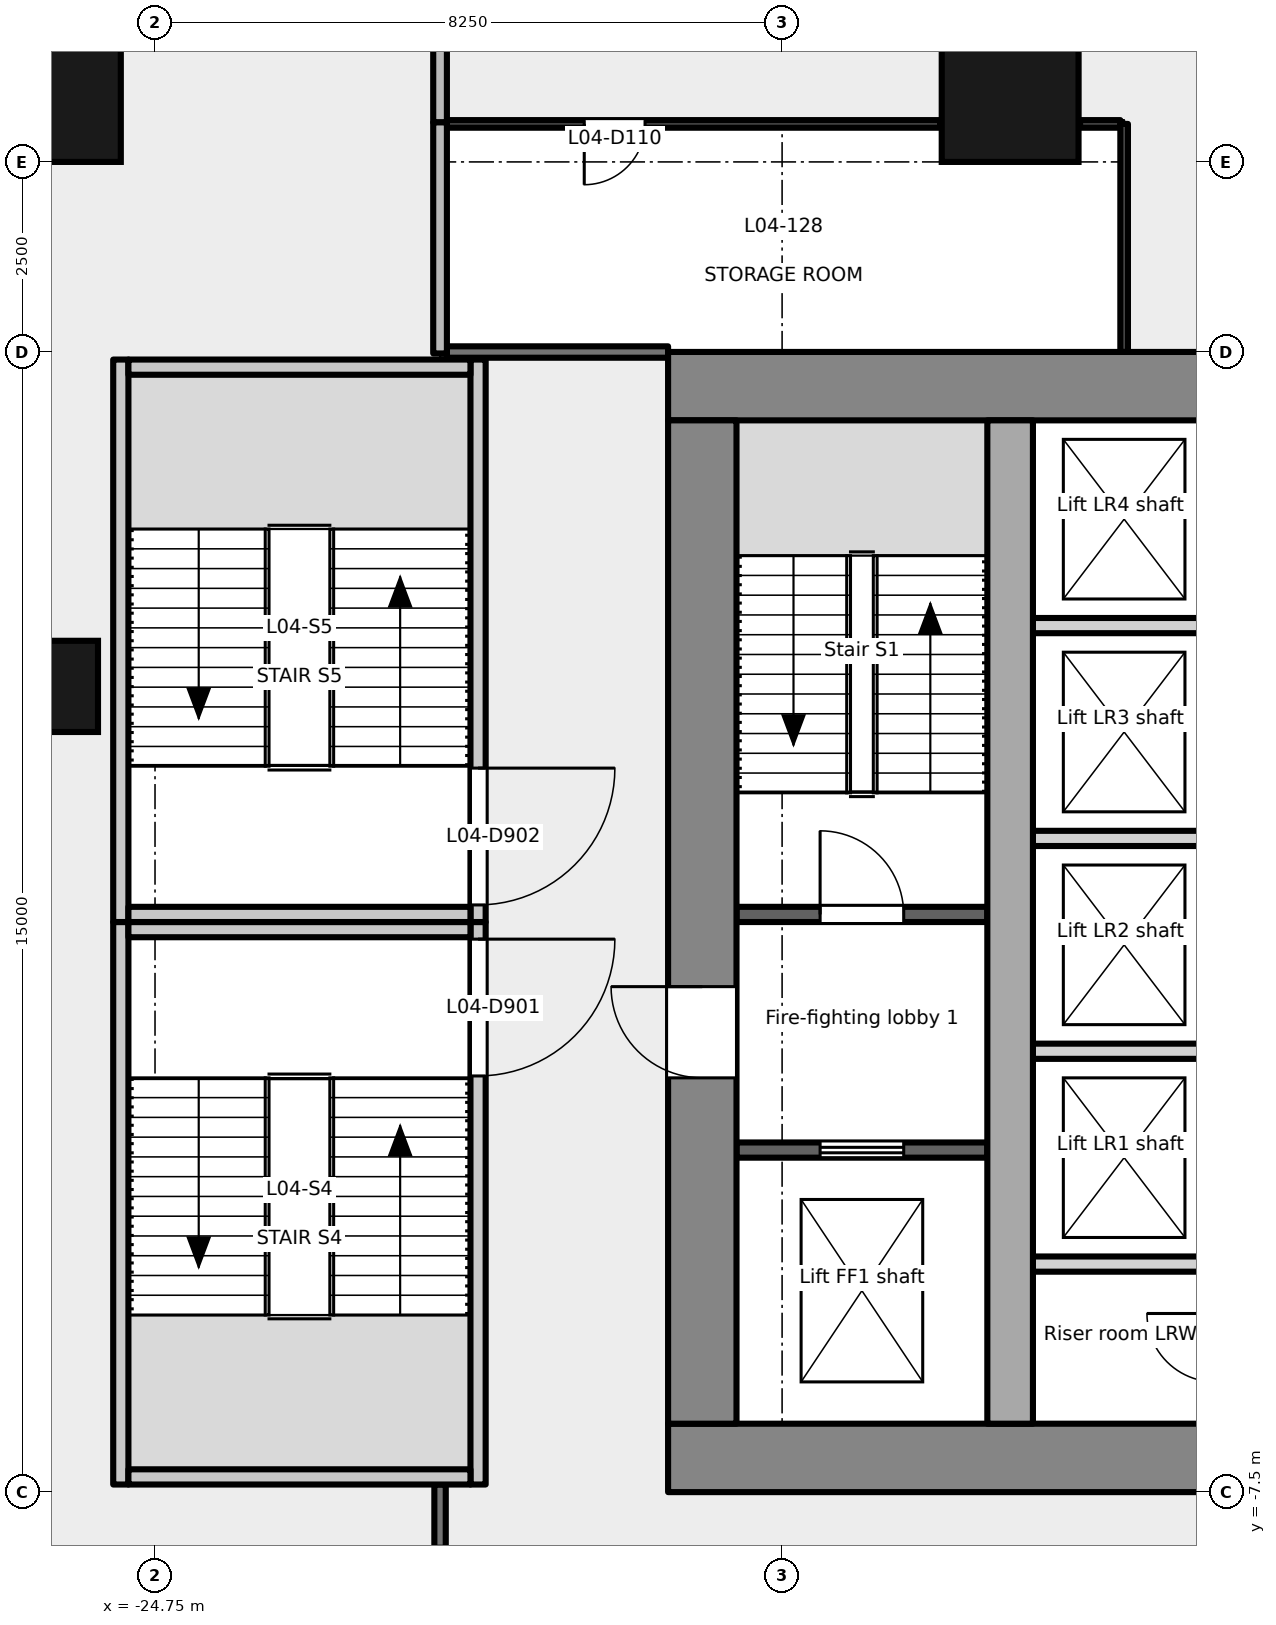
"""IFC4 building model, lengths in metres.
Left out: names, types, materials, properties, quantities, classifications, styles, units other than length and angle.
Written with IfcOpenShell. Run it as: python <this file> out.ifc"""

import sys

from ifc_helpers import new_model, si_unit, direction, frame, frame_2d, origin, origin_2d, place, context, subcontext, project, spatial, rectangle, extrude, element, fill, save


model = new_model("IFC4")
c1 = context("Model", 3, precision=1e-05, world=origin(), true_north=direction((0.0, 1.0)))
c2 = subcontext(c1, "Body", "Model", "MODEL_VIEW")
j1 = project(units=[si_unit("LENGTHUNIT", "METRE"), si_unit("PLANEANGLEUNIT", "RADIAN")], contexts=[c1])
p1 = place(None, origin())
s1 = spatial("IfcSite", under=j1, at=p1, CompositionType="ELEMENT")
p2 = place(p1, origin())
s2 = spatial("IfcBuilding", under=s1, at=p2, CompositionType="ELEMENT")
p3 = place(p2, frame((0.0, 0.0, 22.2)))
s3 = spatial("IfcBuildingStorey", under=s2, at=p3, CompositionType="ELEMENT", Elevation=22.2)
for number, where, z_axis, x_axis in (
    (1, (-26.1, 10.9, -0.2), (0.0, 0.0, 1.0), (1.0, 0.0, 0.0)),
    (2, (-13.5, 10.9, -0.2), (0.0, 0.0, 1.0), (1.0, 0.0, 0.0)),
):
    element("IfcColumn", number, at=place(p3, frame(where, z_axis=z_axis, x_axis=x_axis)), inside=s3, PredefinedType="COLUMN", context=c2, shape_type="SweptSolid", body=[
        extrude(rectangle(XDim=1.8, YDim=1.8, at=origin_2d()), origin(), (0.0, 0.0, 1.0), 4.8),
    ])
p4 = place(p3, frame((-26.1, 3.1, -0.2), z_axis=(0.0, 0.0, 1.0), x_axis=(1.0, 0.0, 0.0)))
e3 = element("IfcColumn", 3, at=p4, inside=s3, PredefinedType="COLUMN", context=c2, shape_type="SweptSolid", body=[
    extrude(rectangle(XDim=1.2, YDim=1.2, at=origin_2d()), origin(), (0.0, 0.0, 1.0), 4.8),
])
p5 = place(p3, frame((-18.0, -7.05, -0.2), z_axis=(0.0, 0.0, 1.0), x_axis=(1.0, 0.0, 0.0)))
e4 = element("IfcWall", 4, at=p5, inside=s3, PredefinedType="SHEAR", context=c2, shape_type="SweptSolid", body=[
    extrude(rectangle(XDim=36.0, YDim=0.9, at=frame_2d((18.0, 0.0))), origin(), (0.0, 0.0, 1.0), 4.8),
])
p6 = place(p5, frame((7.8, 0.0, 0.2)))
e5 = element("IfcOpeningElement", 5, at=p6, cuts=e4, PredefinedType="OPENING", context=c2, shape_type="SweptSolid", body=[
    extrude(rectangle(XDim=2.4, YDim=2.1, at=frame_2d((1.2, 1.05))), frame((0.0, 0.46, 0.0), z_axis=(0.0, -1.0, 0.0), x_axis=(1.0, 0.0, 0.0)), (0.0, 0.0, 1.0), 0.921),
])
p7 = place(p5, frame((17.4, 0.0, 0.2)))
e6 = element("IfcOpeningElement", 6, at=p7, cuts=e4, PredefinedType="OPENING", context=c2, shape_type="SweptSolid", body=[
    extrude(rectangle(XDim=1.2, YDim=2.1, at=frame_2d((0.6, 1.05))), frame((0.0, 0.46, 0.0), z_axis=(0.0, -1.0, 0.0), x_axis=(1.0, 0.0, 0.0)), (0.0, 0.0, 1.0), 0.921),
])
p8 = place(p5, frame((26.1, 0.0, 0.2)))
e7 = element("IfcOpeningElement", 7, at=p8, cuts=e4, PredefinedType="OPENING", context=c2, shape_type="SweptSolid", body=[
    extrude(rectangle(XDim=2.4, YDim=2.1, at=frame_2d((1.2, 1.05))), frame((0.0, 0.46, 0.0), z_axis=(0.0, -1.0, 0.0), x_axis=(1.0, 0.0, 0.0)), (0.0, 0.0, 1.0), 0.921),
])
p9 = place(p3, frame((-18.0, 7.05, -0.2), z_axis=(0.0, 0.0, 1.0), x_axis=(1.0, 0.0, 0.0)))
e8 = element("IfcWall", 8, at=p9, inside=s3, PredefinedType="SHEAR", context=c2, shape_type="SweptSolid", body=[
    extrude(rectangle(XDim=36.0, YDim=0.9, at=frame_2d((18.0, 0.0))), origin(), (0.0, 0.0, 1.0), 4.8),
])
p10 = place(p3, frame((-17.55, -6.6, -0.2), z_axis=(0.0, 0.0, 1.0), x_axis=(0.0, 1.0, 0.0)))
e9 = element("IfcWall", 9, at=p10, inside=s3, PredefinedType="SHEAR", context=c2, shape_type="SweptSolid", body=[
    extrude(rectangle(XDim=13.2, YDim=0.9, at=frame_2d((6.6, 0.0))), origin(), (0.0, 0.0, 1.0), 4.8),
])
p11 = place(p10, frame((4.55, 0.0, 0.2)))
e10 = element("IfcOpeningElement", 10, at=p11, cuts=e9, PredefinedType="OPENING", context=c2, shape_type="SweptSolid", body=[
    extrude(rectangle(XDim=1.2, YDim=2.1, at=frame_2d((0.6, 1.05))), frame((0.0, 0.46, 0.0), z_axis=(0.0, -1.0, 0.0), x_axis=(1.0, 0.0, 0.0)), (0.0, 0.0, 1.0), 0.921),
])
p12 = place(p3, frame((-13.5, -6.6, -0.2), z_axis=(0.0, 0.0, 1.0), x_axis=(0.0, 1.0, 0.0)))
e11 = element("IfcWall", 11, at=p12, inside=s3, PredefinedType="SHEAR", context=c2, shape_type="SweptSolid", body=[
    extrude(rectangle(XDim=13.2, YDim=0.6, at=frame_2d((6.6, 0.0))), origin(), (0.0, 0.0, 1.0), 4.8),
])
p13 = place(p3, frame((-17.1, -3.0, 0.0), z_axis=(0.0, 0.0, 1.0), x_axis=(1.0, 0.0, 0.0)))
e12 = element("IfcWall", 12, at=p13, inside=s3, PredefinedType="PARTITIONING", context=c2, shape_type="SweptSolid", body=[
    extrude(rectangle(XDim=3.3, YDim=0.2, at=frame_2d((1.65, 0.0))), origin(), (0.0, 0.0, 1.0), 4.6),
])
p14 = place(p13, frame((1.1, 0.0, 0.0)))
e13 = element("IfcOpeningElement", 13, at=p14, cuts=e12, PredefinedType="OPENING", context=c2, shape_type="SweptSolid", body=[
    extrude(rectangle(XDim=1.1, YDim=2.1, at=frame_2d((0.55, 1.05))), frame((0.0, 0.111, 0.0), z_axis=(0.0, -1.0, 0.0), x_axis=(1.0, 0.0, 0.0)), (0.0, 0.0, 1.0), 0.221),
])
p15 = place(p3, frame((-17.1, 0.1, 0.0), z_axis=(0.0, 0.0, 1.0), x_axis=(1.0, 0.0, 0.0)))
e14 = element("IfcWall", 14, at=p15, inside=s3, PredefinedType="PARTITIONING", context=c2, shape_type="SweptSolid", body=[
    extrude(rectangle(XDim=3.3, YDim=0.2, at=frame_2d((1.65, 0.0))), origin(), (0.0, 0.0, 1.0), 4.6),
])
p16 = place(p15, frame((1.1, 0.0, 0.0)))
e15 = element("IfcOpeningElement", 15, at=p16, cuts=e14, PredefinedType="OPENING", context=c2, shape_type="SweptSolid", body=[
    extrude(rectangle(XDim=1.1, YDim=2.1, at=frame_2d((0.55, 1.05))), frame((0.0, 0.111, 0.0), z_axis=(0.0, -1.0, 0.0), x_axis=(1.0, 0.0, 0.0)), (0.0, 0.0, 1.0), 0.221),
])
for number, where, z_axis, x_axis in (
    (16, (-13.2, -1.7, 0.0), (0.0, 0.0, 1.0), (1.0, 0.0, 0.0)),
    (17, (-13.2, 1.1, 0.0), (0.0, 0.0, 1.0), (1.0, 0.0, 0.0)),
    (18, (-13.2, 3.9, 0.0), (0.0, 0.0, 1.0), (1.0, 0.0, 0.0)),
    (19, (-13.2, -4.5, 0.0), (0.0, 0.0, 1.0), (1.0, 0.0, 0.0)),
):
    element("IfcWall", number, at=place(p3, frame(where, z_axis=z_axis, x_axis=x_axis)), inside=s3, PredefinedType="PARTITIONING", context=c2, shape_type="SweptSolid", body=[
        extrude(rectangle(XDim=2.3, YDim=0.2, at=frame_2d((1.15, 0.0))), origin(), (0.0, 0.0, 1.0), 4.6),
    ])
p17 = place(p3, frame((-20.5, 0.0, -0.2), z_axis=(0.0, 0.0, 1.0), x_axis=(0.0, -1.0, 0.0)))
e20 = element("IfcWall", 20, at=p17, inside=s3, PredefinedType="SHEAR", context=c2, shape_type="SweptSolid", body=[
    extrude(rectangle(XDim=7.4, YDim=0.2, at=frame_2d((3.7, 0.0))), origin(), (0.0, 0.0, 1.0), 4.8),
])
p18 = place(p17, frame((0.225, 0.0, 0.2)))
e21 = element("IfcOpeningElement", 21, at=p18, cuts=e20, PredefinedType="OPENING", context=c2, shape_type="SweptSolid", body=[
    extrude(rectangle(XDim=1.8, YDim=2.1, at=frame_2d((0.9, 1.05))), frame((0.0, 0.111, 0.0), z_axis=(0.0, -1.0, 0.0), x_axis=(1.0, 0.0, 0.0)), (0.0, 0.0, 1.0), 0.221),
])
p19 = place(p3, frame((-25.2, -7.4, -0.2), z_axis=(0.0, 0.0, 1.0), x_axis=(0.0, 1.0, 0.0)))
e22 = element("IfcWall", 22, at=p19, inside=s3, PredefinedType="SHEAR", context=c2, shape_type="SweptSolid", body=[
    extrude(rectangle(XDim=7.4, YDim=0.2, at=frame_2d((3.7, 0.0))), origin(), (0.0, 0.0, 1.0), 4.8),
])
for number, where, z_axis, x_axis in (
    (23, (-25.1, -0.1, -0.2), (0.0, 0.0, 1.0), (1.0, 0.0, 0.0)),
    (24, (-25.1, -7.3, -0.2), (0.0, 0.0, 1.0), (1.0, 0.0, 0.0)),
):
    element("IfcWall", number, at=place(p3, frame(where, z_axis=z_axis, x_axis=x_axis)), inside=s3, PredefinedType="SHEAR", context=c2, shape_type="SweptSolid", body=[
        extrude(rectangle(XDim=4.5, YDim=0.2, at=frame_2d((2.25, 0.0))), origin(), (0.0, 0.0, 1.0), 4.8),
    ])
p20 = place(p3, frame((-20.5, 7.4, -0.2), z_axis=(0.0, 0.0, 1.0), x_axis=(0.0, -1.0, 0.0)))
e25 = element("IfcWall", 25, at=p20, inside=s3, PredefinedType="SHEAR", context=c2, shape_type="SweptSolid", body=[
    extrude(rectangle(XDim=7.4, YDim=0.2, at=frame_2d((3.7, 0.0))), origin(), (0.0, 0.0, 1.0), 4.8),
])
p21 = place(p20, frame((5.375, 0.0, 0.2)))
e26 = element("IfcOpeningElement", 26, at=p21, cuts=e25, PredefinedType="OPENING", context=c2, shape_type="SweptSolid", body=[
    extrude(rectangle(XDim=1.8, YDim=2.1, at=frame_2d((0.9, 1.05))), frame((0.0, 0.111, 0.0), z_axis=(0.0, -1.0, 0.0), x_axis=(1.0, 0.0, 0.0)), (0.0, 0.0, 1.0), 0.221),
])
p22 = place(p3, frame((-25.2, 0.0, -0.2), z_axis=(0.0, 0.0, 1.0), x_axis=(0.0, 1.0, 0.0)))
e27 = element("IfcWall", 27, at=p22, inside=s3, PredefinedType="SHEAR", context=c2, shape_type="SweptSolid", body=[
    extrude(rectangle(XDim=7.4, YDim=0.2, at=frame_2d((3.7, 0.0))), origin(), (0.0, 0.0, 1.0), 4.8),
])
for number, where, z_axis, x_axis in (
    (28, (-25.1, 7.3, -0.2), (0.0, 0.0, 1.0), (1.0, 0.0, 0.0)),
    (29, (-25.1, 0.1, -0.2), (0.0, 0.0, 1.0), (1.0, 0.0, 0.0)),
):
    element("IfcWall", number, at=place(p3, frame(where, z_axis=z_axis, x_axis=x_axis)), inside=s3, PredefinedType="SHEAR", context=c2, shape_type="SweptSolid", body=[
        extrude(rectangle(XDim=4.5, YDim=0.2, at=frame_2d((2.25, 0.0))), origin(), (0.0, 0.0, 1.0), 4.8),
    ])
p23 = place(p3, frame((-21.0, -11.425, 0.0), z_axis=(0.0, 0.0, 1.0), x_axis=(0.0, 1.0, 0.0)))
e30 = element("IfcWall", 30, at=p23, inside=s3, PredefinedType="PARTITIONING", context=c2, shape_type="SweptSolid", body=[
    extrude(rectangle(XDim=4.025, YDim=0.15, at=frame_2d((2.013, 0.0))), origin(), (0.0, 0.0, 1.0), 4.0),
])
p24 = place(p23, frame((0.813, 0.0, 0.0)))
e31 = element("IfcOpeningElement", 31, at=p24, cuts=e30, PredefinedType="OPENING", context=c2, shape_type="SweptSolid", body=[
    extrude(rectangle(XDim=2.4, YDim=2.4, at=frame_2d((1.2, 1.2))), frame((0.0, 0.085, 0.0), z_axis=(0.0, -1.0, 0.0), x_axis=(1.0, 0.0, 0.0)), (0.0, 0.0, 1.0), 0.171),
])
p25 = place(p3, frame((-20.91, 7.499, 0.0), z_axis=(0.0, 0.0, 1.0), x_axis=(1.0, 0.0, 0.0)))
e32 = element("IfcWall", 32, at=p25, inside=s3, PredefinedType="PARTITIONING", context=c2, shape_type="SweptSolid", body=[
    extrude(rectangle(XDim=2.91, YDim=0.15, at=frame_2d((1.455, 0.0))), origin(), (0.0, 0.0, 1.0), 4.6),
])
p26 = place(p3, frame((-21.0, 11.99, 0.0), z_axis=(0.0, 0.0, 1.0), x_axis=(0.0, -1.0, 0.0)))
e33 = element("IfcWall", 33, at=p26, inside=s3, PredefinedType="PARTITIONING", context=c2, shape_type="SweptSolid", body=[
    extrude(rectangle(XDim=1.47, YDim=0.18, at=frame_2d((0.735, 0.0))), origin(), (0.0, 0.0, 1.0), 4.6),
])
p27 = place(p3, frame((-21.0, 10.52, 0.0), z_axis=(0.0, 0.0, 1.0), x_axis=(0.0, -1.0, 0.0)))
e34 = element("IfcWall", 34, at=p27, inside=s3, PredefinedType="PARTITIONING", context=c2, shape_type="SweptSolid", body=[
    extrude(rectangle(XDim=3.04, YDim=0.18, at=frame_2d((1.52, 0.0))), origin(), (0.0, 0.0, 1.0), 3.5),
])
p28 = place(p3, frame((-14.42, 10.5, 0.0), z_axis=(0.0, 0.0, 1.0), x_axis=(-1.0, 0.0, 0.0)))
e35 = element("IfcWall", 35, at=p28, inside=s3, PredefinedType="PARTITIONING", context=c2, shape_type="SweptSolid", body=[
    extrude(rectangle(XDim=6.49, YDim=0.1, at=frame_2d((3.245, 0.0))), origin(), (0.0, 0.0, 1.0), 4.6),
])
p29 = place(p28, frame((3.883, 0.0, 0.0)))
e36 = element("IfcOpeningElement", 36, at=p29, cuts=e35, PredefinedType="OPENING", context=c2, shape_type="SweptSolid", body=[
    extrude(rectangle(XDim=0.8, YDim=2.1, at=frame_2d((0.4, 1.05))), frame((0.0, 0.061, 0.0), z_axis=(0.0, -1.0, 0.0), x_axis=(1.0, 0.0, 0.0)), (0.0, 0.0, 1.0), 0.121),
])
p30 = place(p3, frame((-12.05, 10.5, 0.0), z_axis=(0.0, 0.0, 1.0), x_axis=(-1.0, 0.0, 0.0)))
e37 = element("IfcWall", 37, at=p30, inside=s3, PredefinedType="PARTITIONING", context=c2, shape_type="SweptSolid", body=[
    extrude(rectangle(XDim=0.53, YDim=0.1, at=frame_2d((0.265, 0.0))), origin(), (0.0, 0.0, 1.0), 4.6),
])
p31 = place(p3, frame((-12.0, 7.5, 0.0), z_axis=(0.0, 0.0, 1.0), x_axis=(0.0, 1.0, 0.0)))
e38 = element("IfcWall", 38, at=p31, inside=s3, PredefinedType="PARTITIONING", context=c2, shape_type="SweptSolid", body=[
    extrude(rectangle(XDim=3.0, YDim=0.1, at=frame_2d((1.5, 0.0))), origin(), (0.0, 0.0, 1.0), 3.5),
])
p32 = place(p14, origin())
e39 = element("IfcDoor", 39, at=p32, inside=s3, OperationType="DOUBLE_DOOR_SLIDING", PredefinedType="DOOR", context=c2, shape_type="SweptSolid", body=[
    extrude(rectangle(XDim=1.1, YDim=2.1, at=frame_2d((0.55, 1.05))), frame((0.0, 0.025, 0.0), z_axis=(0.0, -1.0, 0.0), x_axis=(1.0, 0.0, 0.0)), (0.0, 0.0, 1.0), 0.05),
])
fill(e13, e39)
p33 = place(p11, origin())
e40 = element("IfcDoor", 40, at=p33, inside=s3, OperationType="SINGLE_SWING_RIGHT", PredefinedType="DOOR", context=c2, shape_type="SweptSolid", body=[
    extrude(rectangle(XDim=1.2, YDim=2.1, at=frame_2d((0.6, 1.05))), frame((0.0, 0.025, 0.0), z_axis=(0.0, -1.0, 0.0), x_axis=(1.0, 0.0, 0.0)), (0.0, 0.0, 1.0), 0.05),
])
fill(e10, e40)
p34 = place(p16, origin())
e41 = element("IfcDoor", 41, at=p34, inside=s3, OperationType="SINGLE_SWING_LEFT", PredefinedType="DOOR", context=c2, shape_type="SweptSolid", body=[
    extrude(rectangle(XDim=1.1, YDim=2.1, at=frame_2d((0.55, 1.05))), frame((0.0, 0.025, 0.0), z_axis=(0.0, -1.0, 0.0), x_axis=(1.0, 0.0, 0.0)), (0.0, 0.0, 1.0), 0.05),
])
fill(e15, e41)
p35 = place(p18, origin())
e42 = element("IfcDoor", 42, at=p35, inside=s3, OperationType="DOUBLE_DOOR_SINGLE_SWING", PredefinedType="DOOR", context=c2, shape_type="SweptSolid", body=[
    extrude(rectangle(XDim=1.8, YDim=2.1, at=frame_2d((0.9, 1.05))), frame((0.0, 0.025, 0.0), z_axis=(0.0, -1.0, 0.0), x_axis=(1.0, 0.0, 0.0)), (0.0, 0.0, 1.0), 0.05),
])
fill(e21, e42)
p36 = place(p21, origin())
e43 = element("IfcDoor", 43, at=p36, inside=s3, OperationType="DOUBLE_DOOR_SINGLE_SWING", PredefinedType="DOOR", context=c2, shape_type="SweptSolid", body=[
    extrude(rectangle(XDim=1.8, YDim=2.1, at=frame_2d((0.9, 1.05))), frame((0.0, 0.025, 0.0), z_axis=(0.0, -1.0, 0.0), x_axis=(1.0, 0.0, 0.0)), (0.0, 0.0, 1.0), 0.05),
])
fill(e26, e43)
p37 = place(p29, origin())
e44 = element("IfcDoor", 44, at=p37, inside=s3, OperationType="SINGLE_SWING_RIGHT", PredefinedType="DOOR", context=c2, shape_type="SweptSolid", body=[
    extrude(rectangle(XDim=0.8, YDim=2.1, at=frame_2d((0.4, 1.05))), frame((0.0, 0.025, 0.0), z_axis=(0.0, -1.0, 0.0), x_axis=(1.0, 0.0, 0.0)), (0.0, 0.0, 1.0), 0.05),
])
fill(e36, e44)
save(model, sys.argv[1])
